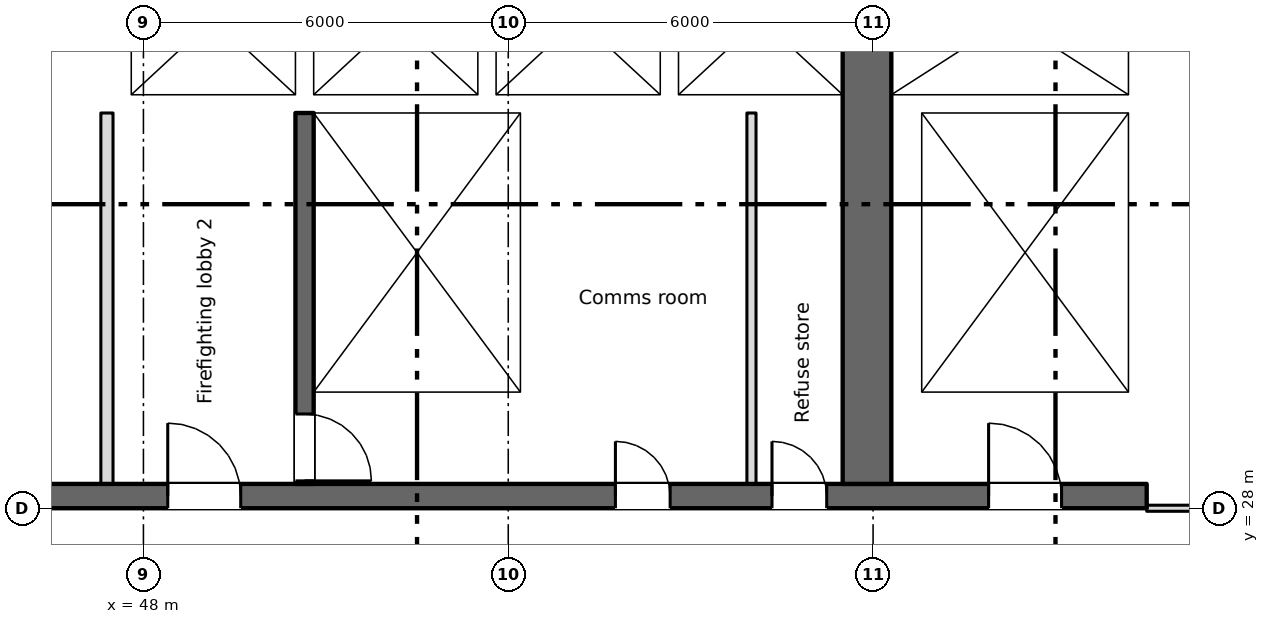
"""IFC4 building model, lengths in metres.
Left out: names, types, materials, properties, quantities, classifications, styles, units other than length and angle.
Written with IfcOpenShell. Run it as: python <this file> out.ifc"""

import sys

from ifc_helpers import new_model, si_unit, direction, frame, frame_2d, origin, place, context, subcontext, project, spatial, rectangle, extrude, element, fill, save


model = new_model("IFC4")
c1 = context("Model", 3, precision=1e-05, world=origin(), true_north=direction((0.0, 1.0)))
c2 = subcontext(c1, "Body", "Model", "MODEL_VIEW")
j1 = project(units=[si_unit("LENGTHUNIT", "METRE"), si_unit("PLANEANGLEUNIT", "RADIAN")], contexts=[c1])
p1 = place(None, origin())
s1 = spatial("IfcSite", under=j1, at=p1, CompositionType="ELEMENT")
p2 = place(p1, origin())
s2 = spatial("IfcBuilding", under=s1, at=p2, CompositionType="ELEMENT")
p3 = place(p2, frame((0.0, 0.0, 121.25)))
s3 = spatial("IfcBuildingStorey", under=s2, at=p3, CompositionType="ELEMENT", Elevation=121.25)
p4 = place(p3, frame((6.7, 28.2, 0.0), z_axis=(0.0, 0.0, 1.0), x_axis=(1.0, 0.0, 0.0)))
e1 = element("IfcWall", 1, at=p4, inside=s3, PredefinedType="SHEAR", context=c2, shape_type="SweptSolid", body=[
    extrude(rectangle(XDim=57.8, YDim=0.4, at=frame_2d((28.9, 0.0))), origin(), (0.0, 0.0, 1.0), 3.35),
])
p5 = place(p4, frame((12.062, 0.0, 0.0)))
e2 = element("IfcOpeningElement", 2, at=p5, cuts=e1, PredefinedType="OPENING", context=c2, shape_type="SweptSolid", body=[
    extrude(rectangle(XDim=0.9, YDim=2.1, at=frame_2d((0.45, 1.05))), frame((0.0, 0.21, 0.0), z_axis=(0.0, -1.0, 0.0), x_axis=(1.0, 0.0, 0.0)), (0.0, 0.0, 1.0), 0.42),
])
p6 = place(p4, frame((14.637, 0.0, 0.0)))
e3 = element("IfcOpeningElement", 3, at=p6, cuts=e1, PredefinedType="OPENING", context=c2, shape_type="SweptSolid", body=[
    extrude(rectangle(XDim=0.9, YDim=2.1, at=frame_2d((0.45, 1.05))), frame((0.0, 0.21, 0.0), z_axis=(0.0, -1.0, 0.0), x_axis=(1.0, 0.0, 0.0)), (0.0, 0.0, 1.0), 0.42),
])
p7 = place(p4, frame((49.062, 0.0, 0.0)))
e4 = element("IfcOpeningElement", 4, at=p7, cuts=e1, PredefinedType="OPENING", context=c2, shape_type="SweptSolid", body=[
    extrude(rectangle(XDim=0.9, YDim=2.1, at=frame_2d((0.45, 1.05))), frame((0.0, 0.21, 0.0), z_axis=(0.0, -1.0, 0.0), x_axis=(1.0, 0.0, 0.0)), (0.0, 0.0, 1.0), 0.42),
])
p8 = place(p4, frame((51.637, 0.0, 0.0)))
e5 = element("IfcOpeningElement", 5, at=p8, cuts=e1, PredefinedType="OPENING", context=c2, shape_type="SweptSolid", body=[
    extrude(rectangle(XDim=0.9, YDim=2.1, at=frame_2d((0.45, 1.05))), frame((0.0, 0.21, 0.0), z_axis=(0.0, -1.0, 0.0), x_axis=(1.0, 0.0, 0.0)), (0.0, 0.0, 1.0), 0.42),
])
p9 = place(p4, frame((1.35, 0.0, 0.0)))
e6 = element("IfcOpeningElement", 6, at=p9, cuts=e1, PredefinedType="OPENING", context=c2, shape_type="SweptSolid", body=[
    extrude(rectangle(XDim=0.9, YDim=2.1, at=frame_2d((0.45, 1.05))), frame((0.0, 0.21, 0.0), z_axis=(0.0, -1.0, 0.0), x_axis=(1.0, 0.0, 0.0)), (0.0, 0.0, 1.0), 0.42),
])
p10 = place(p4, frame((4.7, 0.0, 0.0)))
e7 = element("IfcOpeningElement", 7, at=p10, cuts=e1, PredefinedType="OPENING", context=c2, shape_type="SweptSolid", body=[
    extrude(rectangle(XDim=1.2, YDim=2.1, at=frame_2d((0.6, 1.05))), frame((0.0, 0.21, 0.0), z_axis=(0.0, -1.0, 0.0), x_axis=(1.0, 0.0, 0.0)), (0.0, 0.0, 1.0), 0.42),
])
p11 = place(p4, frame((31.7, 0.0, 0.0)))
e8 = element("IfcOpeningElement", 8, at=p11, cuts=e1, PredefinedType="OPENING", context=c2, shape_type="SweptSolid", body=[
    extrude(rectangle(XDim=1.2, YDim=2.1, at=frame_2d((0.6, 1.05))), frame((0.0, 0.21, 0.0), z_axis=(0.0, -1.0, 0.0), x_axis=(1.0, 0.0, 0.0)), (0.0, 0.0, 1.0), 0.42),
])
p12 = place(p4, frame((55.2, 0.0, 0.0)))
e9 = element("IfcOpeningElement", 9, at=p12, cuts=e1, PredefinedType="OPENING", context=c2, shape_type="SweptSolid", body=[
    extrude(rectangle(XDim=1.2, YDim=2.1, at=frame_2d((0.6, 1.05))), frame((0.0, 0.21, 0.0), z_axis=(0.0, -1.0, 0.0), x_axis=(1.0, 0.0, 0.0)), (0.0, 0.0, 1.0), 0.42),
])
p13 = place(p4, frame((21.7, 0.0, 0.0)))
e10 = element("IfcOpeningElement", 10, at=p13, cuts=e1, PredefinedType="OPENING", context=c2, shape_type="SweptSolid", body=[
    extrude(rectangle(XDim=1.2, YDim=2.1, at=frame_2d((0.6, 1.05))), frame((0.0, 0.21, 0.0), z_axis=(0.0, -1.0, 0.0), x_axis=(1.0, 0.0, 0.0)), (0.0, 0.0, 1.0), 0.42),
])
p14 = place(p4, frame((41.7, 0.0, 0.0)))
e11 = element("IfcOpeningElement", 11, at=p14, cuts=e1, PredefinedType="OPENING", context=c2, shape_type="SweptSolid", body=[
    extrude(rectangle(XDim=1.2, YDim=2.1, at=frame_2d((0.6, 1.05))), frame((0.0, 0.21, 0.0), z_axis=(0.0, -1.0, 0.0), x_axis=(1.0, 0.0, 0.0)), (0.0, 0.0, 1.0), 0.42),
])
p15 = place(p4, frame((24.85, 0.0, 0.0)))
e12 = element("IfcOpeningElement", 12, at=p15, cuts=e1, PredefinedType="OPENING", context=c2, shape_type="SweptSolid", body=[
    extrude(rectangle(XDim=2.4, YDim=2.1, at=frame_2d((1.2, 1.05))), frame((0.0, 0.21, 0.0), z_axis=(0.0, -1.0, 0.0), x_axis=(1.0, 0.0, 0.0)), (0.0, 0.0, 1.0), 0.42),
])
p16 = place(p4, frame((37.35, 0.0, 0.0)))
e13 = element("IfcOpeningElement", 13, at=p16, cuts=e1, PredefinedType="OPENING", context=c2, shape_type="SweptSolid", body=[
    extrude(rectangle(XDim=2.4, YDim=2.1, at=frame_2d((1.2, 1.05))), frame((0.0, 0.21, 0.0), z_axis=(0.0, -1.0, 0.0), x_axis=(1.0, 0.0, 0.0)), (0.0, 0.0, 1.0), 0.42),
])
p17 = place(p4, frame((7.95, 0.0, 0.0)))
e14 = element("IfcOpeningElement", 14, at=p17, cuts=e1, PredefinedType="OPENING", context=c2, shape_type="SweptSolid", body=[
    extrude(rectangle(XDim=2.4, YDim=2.1, at=frame_2d((1.2, 1.05))), frame((0.0, 0.21, 0.0), z_axis=(0.0, -1.0, 0.0), x_axis=(1.0, 0.0, 0.0)), (0.0, 0.0, 1.0), 0.42),
])
p18 = place(p4, frame((28.85, 0.0, 0.0)))
e15 = element("IfcOpeningElement", 15, at=p18, cuts=e1, PredefinedType="OPENING", context=c2, shape_type="SweptSolid", body=[
    extrude(rectangle(XDim=0.9, YDim=2.1, at=frame_2d((0.45, 1.05))), frame((0.0, 0.21, 0.0), z_axis=(0.0, -1.0, 0.0), x_axis=(1.0, 0.0, 0.0)), (0.0, 0.0, 1.0), 0.42),
])
p19 = place(p4, frame((34.85, 0.0, 0.0)))
e16 = element("IfcOpeningElement", 16, at=p19, cuts=e1, PredefinedType="OPENING", context=c2, shape_type="SweptSolid", body=[
    extrude(rectangle(XDim=0.9, YDim=2.1, at=frame_2d((0.45, 1.05))), frame((0.0, 0.21, 0.0), z_axis=(0.0, -1.0, 0.0), x_axis=(1.0, 0.0, 0.0)), (0.0, 0.0, 1.0), 0.42),
])
p20 = place(p3, frame((64.35, 34.8, 0.0), z_axis=(0.0, 0.0, 1.0), x_axis=(0.0, 1.0, 0.0)))
e17 = element("IfcWall", 17, at=p20, inside=s3, PredefinedType="SHEAR", context=c2, shape_type="SweptSolid", body=[
    extrude(rectangle(XDim=10.4, YDim=0.3, at=frame_2d((5.2, 0.0))), origin(), (0.0, 0.0, 1.0), 3.35),
])
p21 = place(p3, frame((59.9, 28.4, 0.0), z_axis=(0.0, 0.0, 1.0), x_axis=(0.0, 1.0, 0.0)))
e18 = element("IfcWall", 18, at=p21, inside=s3, PredefinedType="SHEAR", context=c2, shape_type="SweptSolid", body=[
    extrude(rectangle(XDim=16.8, YDim=0.8, at=frame_2d((8.4, 0.0))), origin(), (0.0, 0.0, 1.0), 3.35),
])
p22 = place(p21, frame((9.6, 0.0, 0.0)))
e19 = element("IfcOpeningElement", 19, at=p22, cuts=e18, PredefinedType="OPENING", context=c2, shape_type="SweptSolid", body=[
    extrude(rectangle(XDim=2.0, YDim=2.1, at=frame_2d((1.0, 1.05))), frame((0.0, 0.41, 0.0), z_axis=(0.0, -1.0, 0.0), x_axis=(1.0, 0.0, 0.0)), (0.0, 0.0, 1.0), 0.82),
])
p23 = place(p21, frame((15.35, 0.0, 0.0)))
e20 = element("IfcOpeningElement", 20, at=p23, cuts=e18, PredefinedType="OPENING", context=c2, shape_type="SweptSolid", body=[
    extrude(rectangle(XDim=1.2, YDim=2.1, at=frame_2d((0.6, 1.05))), frame((0.0, 0.41, 0.0), z_axis=(0.0, -1.0, 0.0), x_axis=(1.0, 0.0, 0.0)), (0.0, 0.0, 1.0), 0.82),
])
p24 = place(p3, frame((50.65, 34.5, 0.0), z_axis=(0.0, 0.0, 1.0), x_axis=(0.0, -1.0, 0.0)))
e21 = element("IfcWall", 21, at=p24, inside=s3, PredefinedType="SHEAR", context=c2, shape_type="SweptSolid", body=[
    extrude(rectangle(XDim=6.1, YDim=0.3, at=frame_2d((3.05, 0.0))), origin(), (0.0, 0.0, 1.0), 3.35),
])
p25 = place(p24, frame((4.95, 0.0, 0.0)))
e22 = element("IfcOpeningElement", 22, at=p25, cuts=e21, PredefinedType="OPENING", context=c2, shape_type="SweptSolid", body=[
    extrude(rectangle(XDim=1.1, YDim=2.1, at=frame_2d((0.55, 1.05))), frame((0.0, 0.16, 0.0), z_axis=(0.0, -1.0, 0.0), x_axis=(1.0, 0.0, 0.0)), (0.0, 0.0, 1.0), 0.32),
])
p26 = place(p3, frame((54.35, 28.4, 0.0), z_axis=(0.0, 0.0, 1.0), x_axis=(0.0, 1.0, 0.0)))
e23 = element("IfcWall", 23, at=p26, inside=s3, PredefinedType="SHEAR", context=c2, shape_type="SweptSolid", body=[
    extrude(rectangle(XDim=6.1, YDim=0.3, at=frame_2d((3.05, 0.0))), origin(), (0.0, 0.0, 1.0), 3.35),
])
p27 = place(p3, frame((60.55, 28.4, 0.0), z_axis=(0.0, 0.0, 1.0), x_axis=(0.0, 1.0, 0.0)))
e24 = element("IfcWall", 24, at=p27, inside=s3, PredefinedType="SHEAR", context=c2, shape_type="SweptSolid", body=[
    extrude(rectangle(XDim=6.1, YDim=0.5, at=frame_2d((3.05, 0.0))), origin(), (0.0, 0.0, 1.0), 3.35),
])
p28 = place(p3, frame((64.35, 28.4, 0.0), z_axis=(0.0, 0.0, 1.0), x_axis=(0.0, 1.0, 0.0)))
e25 = element("IfcWall", 25, at=p28, inside=s3, PredefinedType="SHEAR", context=c2, shape_type="SweptSolid", body=[
    extrude(rectangle(XDim=6.1, YDim=0.3, at=frame_2d((3.05, 0.0))), origin(), (0.0, 0.0, 1.0), 3.35),
])
p29 = place(p3, frame((47.3, 34.65, 0.0), z_axis=(0.0, 0.0, 1.0), x_axis=(1.0, 0.0, 0.0)))
e26 = element("IfcWall", 26, at=p29, inside=s3, PredefinedType="SHEAR", context=c2, shape_type="SweptSolid", body=[
    extrude(rectangle(XDim=12.2, YDim=0.3, at=frame_2d((6.1, 0.0))), origin(), (0.0, 0.0, 1.0), 3.35),
])
p30 = place(p29, frame((1.3, 0.0, 0.0)))
e27 = element("IfcOpeningElement", 27, at=p30, cuts=e26, PredefinedType="OPENING", context=c2, shape_type="SweptSolid", body=[
    extrude(rectangle(XDim=1.1, YDim=2.1, at=frame_2d((0.55, 1.05))), frame((0.0, 0.16, 0.0), z_axis=(0.0, -1.0, 0.0), x_axis=(1.0, 0.0, 0.0)), (0.0, 0.0, 1.0), 0.32),
])
p31 = place(p3, frame((60.3, 34.65, 0.0), z_axis=(0.0, 0.0, 1.0), x_axis=(1.0, 0.0, 0.0)))
e28 = element("IfcWall", 28, at=p31, inside=s3, PredefinedType="SHEAR", context=c2, shape_type="SweptSolid", body=[
    extrude(rectangle(XDim=4.2, YDim=0.3, at=frame_2d((2.1, 0.0))), origin(), (0.0, 0.0, 1.0), 3.35),
])
p32 = place(p3, frame((47.55, 34.8, 0.0), z_axis=(0.0, 0.0, 1.0), x_axis=(0.0, 1.0, 0.0)))
e29 = element("IfcWall", 29, at=p32, inside=s3, PredefinedType="SHEAR", context=c2, shape_type="SweptSolid", body=[
    extrude(rectangle(XDim=2.5, YDim=0.5, at=frame_2d((1.25, 0.0))), origin(), (0.0, 0.0, 1.0), 3.35),
])
for number, where, z_axis, x_axis in (
    (30, (50.65, 34.8, 0.0), (0.0, 0.0, 1.0), (0.0, 1.0, 0.0)),
    (31, (53.65, 34.8, 0.0), (0.0, 0.0, 1.0), (0.0, 1.0, 0.0)),
    (32, (56.65, 34.8, 0.0), (0.0, 0.0, 1.0), (0.0, 1.0, 0.0)),
):
    element("IfcWall", number, at=place(p3, frame(where, z_axis=z_axis, x_axis=x_axis)), inside=s3, PredefinedType="SHEAR", context=c2, shape_type="SweptSolid", body=[
        extrude(rectangle(XDim=2.5, YDim=0.3, at=frame_2d((1.25, 0.0))), origin(), (0.0, 0.0, 1.0), 3.35),
    ])
p33 = place(p3, frame((47.4, 28.4, 0.0), z_axis=(0.0, 0.0, 1.0), x_axis=(0.0, 1.0, 0.0)))
e33 = element("IfcWall", 33, at=p33, inside=s3, PredefinedType="PARTITIONING", context=c2, shape_type="SweptSolid", body=[
    extrude(rectangle(XDim=6.1, YDim=0.2, at=frame_2d((3.05, 0.0))), origin(), (0.0, 0.0, 1.0), 3.35),
])
p34 = place(p3, frame((58.0, 28.4, 0.0), z_axis=(0.0, 0.0, 1.0), x_axis=(0.0, 1.0, 0.0)))
e34 = element("IfcWall", 34, at=p34, inside=s3, PredefinedType="PARTITIONING", context=c2, shape_type="SweptSolid", body=[
    extrude(rectangle(XDim=6.1, YDim=0.15, at=frame_2d((3.05, 0.0))), origin(), (0.0, 0.0, 1.0), 3.35),
])
p35 = place(p3, frame((64.5, 28.0, 0.0), z_axis=(0.0, 0.0, 1.0), x_axis=(1.0, 0.0, 0.0)))
e35 = element("IfcWall", 35, at=p35, inside=s3, PredefinedType="PARTITIONING", context=c2, shape_type="SweptSolid", body=[
    extrude(rectangle(XDim=6.8, YDim=0.1, at=frame_2d((3.4, 0.0))), origin(), (0.0, 0.0, 1.0), 3.35),
])
p36 = place(p35, frame((2.5, 0.0, 0.0)))
e36 = element("IfcOpeningElement", 36, at=p36, cuts=e35, PredefinedType="OPENING", context=c2, shape_type="SweptSolid", body=[
    extrude(rectangle(XDim=1.8, YDim=2.1, at=frame_2d((0.9, 1.05))), frame((0.0, 0.06, 0.0), z_axis=(0.0, -1.0, 0.0), x_axis=(1.0, 0.0, 0.0)), (0.0, 0.0, 1.0), 0.12),
])
p37 = place(p7, origin())
e37 = element("IfcDoor", 37, at=p37, inside=s3, OperationType="SINGLE_SWING_LEFT", PredefinedType="DOOR", context=c2, shape_type="SweptSolid", body=[
    extrude(rectangle(XDim=0.9, YDim=2.1, at=frame_2d((0.45, 1.05))), frame((0.0, 0.025, 0.0), z_axis=(0.0, -1.0, 0.0), x_axis=(1.0, 0.0, 0.0)), (0.0, 0.0, 1.0), 0.05),
])
fill(e4, e37)
p38 = place(p8, origin())
e38 = element("IfcDoor", 38, at=p38, inside=s3, OperationType="SINGLE_SWING_LEFT", PredefinedType="DOOR", context=c2, shape_type="SweptSolid", body=[
    extrude(rectangle(XDim=0.9, YDim=2.1, at=frame_2d((0.45, 1.05))), frame((0.0, 0.025, 0.0), z_axis=(0.0, -1.0, 0.0), x_axis=(1.0, 0.0, 0.0)), (0.0, 0.0, 1.0), 0.05),
])
fill(e5, e38)
p39 = place(p30, origin())
e39 = element("IfcDoor", 39, at=p39, inside=s3, OperationType="SLIDING_TO_LEFT", PredefinedType="DOOR", context=c2, shape_type="SweptSolid", body=[
    extrude(rectangle(XDim=1.1, YDim=2.1, at=frame_2d((0.55, 1.05))), frame((0.0, 0.025, 0.0), z_axis=(0.0, -1.0, 0.0), x_axis=(1.0, 0.0, 0.0)), (0.0, 0.0, 1.0), 0.05),
])
fill(e27, e39)
p40 = place(p25, origin())
e40 = element("IfcDoor", 40, at=p40, inside=s3, OperationType="SINGLE_SWING_RIGHT", PredefinedType="DOOR", context=c2, shape_type="SweptSolid", body=[
    extrude(rectangle(XDim=1.1, YDim=2.1, at=frame_2d((0.55, 1.05))), frame((0.0, 0.025, 0.0), z_axis=(0.0, -1.0, 0.0), x_axis=(1.0, 0.0, 0.0)), (0.0, 0.0, 1.0), 0.05),
])
fill(e22, e40)
p41 = place(p12, origin())
e41 = element("IfcDoor", 41, at=p41, inside=s3, OperationType="SINGLE_SWING_LEFT", PredefinedType="DOOR", context=c2, shape_type="SweptSolid", body=[
    extrude(rectangle(XDim=1.2, YDim=2.1, at=frame_2d((0.6, 1.05))), frame((0.0, 0.025, 0.0), z_axis=(0.0, -1.0, 0.0), x_axis=(1.0, 0.0, 0.0)), (0.0, 0.0, 1.0), 0.05),
])
fill(e9, e41)
p42 = place(p14, origin())
e42 = element("IfcDoor", 42, at=p42, inside=s3, OperationType="SINGLE_SWING_LEFT", PredefinedType="DOOR", context=c2, shape_type="SweptSolid", body=[
    extrude(rectangle(XDim=1.2, YDim=2.1, at=frame_2d((0.6, 1.05))), frame((0.0, 0.025, 0.0), z_axis=(0.0, -1.0, 0.0), x_axis=(1.0, 0.0, 0.0)), (0.0, 0.0, 1.0), 0.05),
])
fill(e11, e42)
save(model, sys.argv[1])
